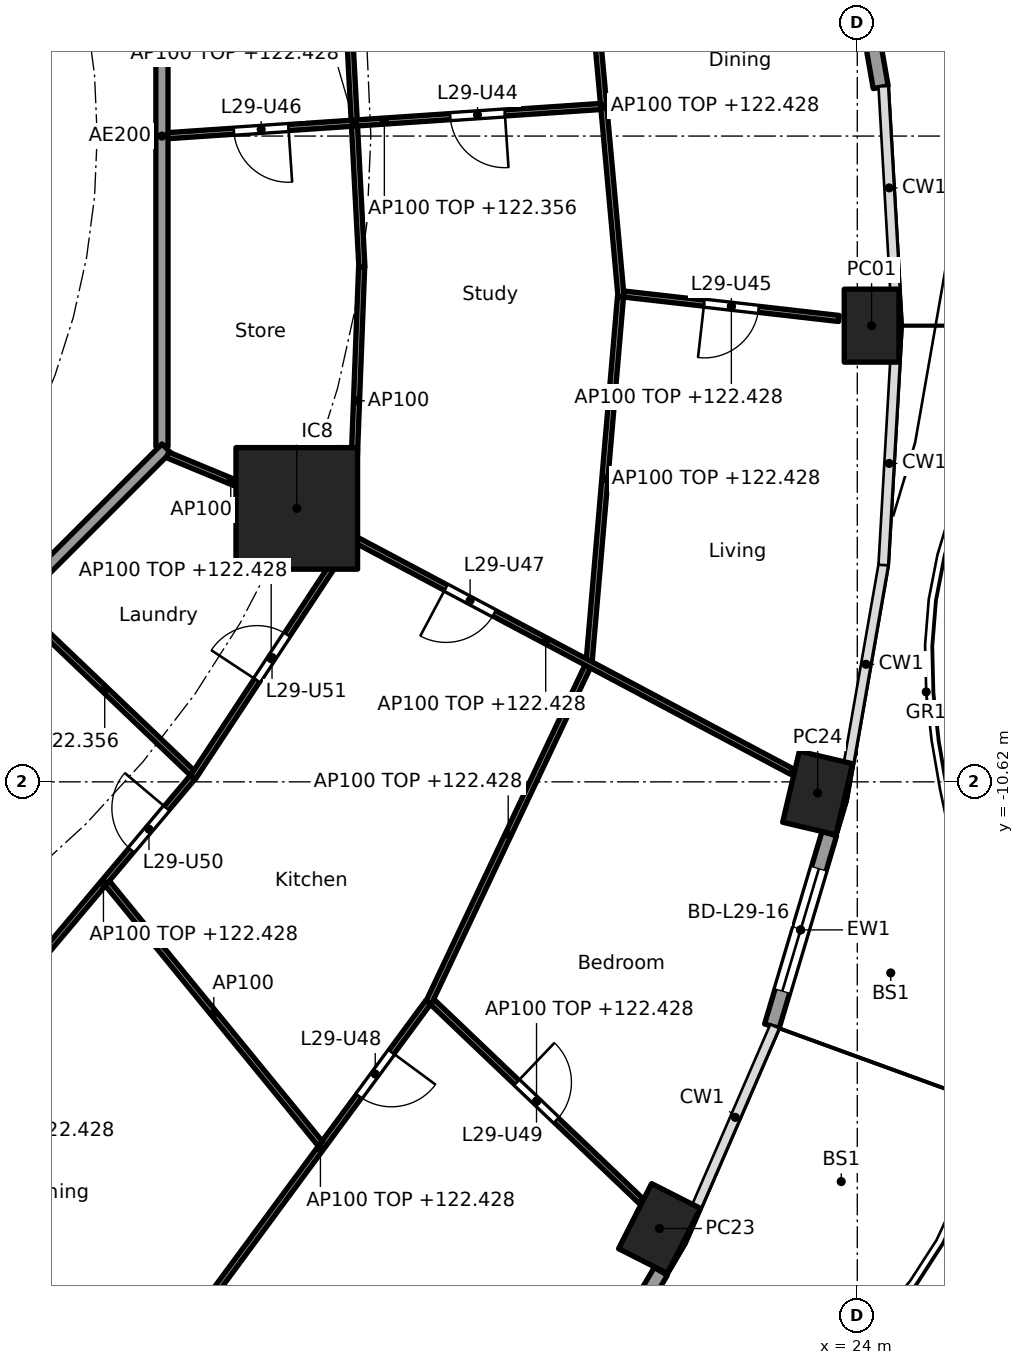
"""IFC4 building model, lengths in metres.
Left out: names, types, materials, properties, quantities, classifications, styles, units other than length and angle.
Written with IfcOpenShell. Run it as: python <this file> out.ifc"""

import sys

from ifc_helpers import new_model, si_unit, direction, frame, frame_2d, origin, origin_2d, place, context, subcontext, project, spatial, rectangle, hollow_rectangle, extrude, element, fill, save


model = new_model("IFC4")
c1 = context("Model", 3, precision=1e-05, world=origin(), true_north=direction((0.0, 1.0)))
c2 = subcontext(c1, "Body", "Model", "MODEL_VIEW")
j1 = project(units=[si_unit("LENGTHUNIT", "METRE"), si_unit("PLANEANGLEUNIT", "RADIAN")], contexts=[c1])
p1 = place(None, origin())
s1 = spatial("IfcSite", under=j1, at=p1, CompositionType="ELEMENT")
p2 = place(p1, origin())
s2 = spatial("IfcBuilding", under=s1, at=p2, CompositionType="ELEMENT")
p3 = place(p2, frame((0.0, 0.0, 119.6)))
s3 = spatial("IfcBuildingStorey", under=s2, at=p3, CompositionType="ELEMENT", Elevation=119.6)
for number, where, z_axis, x_axis in (
    (1, (24.235, -3.118, -0.26), (0.0, 0.0, 1.0), (0.0, 1.0, 0.0)),
    (2, (20.747, -17.965, -0.26), (0.0, 0.0, 1.0), (0.452, 0.892, 0.0)),
    (3, (23.348, -10.803, -0.26), (0.0, 0.0, 1.0), (0.229, 0.973, 0.0)),
):
    element("IfcColumn", number, at=place(p3, frame(where, z_axis=z_axis, x_axis=x_axis)), inside=s3, PredefinedType="COLUMN", context=c2, shape_type="SweptSolid", body=[
        extrude(hollow_rectangle(XDim=1.2, YDim=0.9, WallThickness=0.04, at=origin_2d()), origin(), (0.0, 0.0, 1.0), 3.96),
    ])
p4 = place(p3, frame((14.782, -6.123, 0.0), z_axis=(0.0, 0.0, 1.0), x_axis=(1.0, 0.0, 0.0)))
e4 = element("IfcColumn", 4, at=p4, inside=s3, PredefinedType="COLUMN", context=c2, shape_type="SweptSolid", body=[
    extrude(rectangle(XDim=2.0, YDim=2.0, at=origin_2d()), origin(), (0.0, 0.0, 1.0), 3.7),
])
p5 = place(p3, frame((23.811, 4.085, 0.0), z_axis=(0.0, 0.0, 1.0), x_axis=(0.172163521006, -0.985068384446, 0.0)))
e5 = element("IfcWall", 5, at=p5, inside=s3, PredefinedType="SOLIDWALL", context=c2, shape_type="SweptSolid", body=[
    extrude(rectangle(XDim=3.333, YDim=0.25, at=frame_2d((1.666, 0.0))), origin(), (0.0, 0.0, 1.0), 3.44),
])
p6 = place(p5, frame((0.616, 0.0, 0.0)))
e6 = element("IfcOpeningElement", 6, at=p6, cuts=e5, PredefinedType="OPENING", context=c2, shape_type="SweptSolid", body=[
    extrude(rectangle(XDim=2.1, YDim=2.4, at=frame_2d((1.05, 1.2))), frame((0.0, 0.135, 0.0), z_axis=(0.0, -1.0, 0.0), x_axis=(1.0, 0.0, 0.0)), (0.0, 0.0, 1.0), 0.27),
])
p7 = place(p3, frame((20.768, -18.669, 0.0), z_axis=(0.0, 0.0, 1.0), x_axis=(-0.506314982873, -0.862348617508, 0.0)))
e7 = element("IfcWall", 7, at=p7, inside=s3, PredefinedType="SOLIDWALL", context=c2, shape_type="SweptSolid", body=[
    extrude(rectangle(XDim=3.208, YDim=0.25, at=frame_2d((1.604, 0.0))), origin(), (0.0, 0.0, 1.0), 3.44),
])
p8 = place(p7, frame((0.554, 0.0, 0.0)))
e8 = element("IfcOpeningElement", 8, at=p8, cuts=e7, PredefinedType="OPENING", context=c2, shape_type="SweptSolid", body=[
    extrude(rectangle(XDim=2.1, YDim=2.4, at=frame_2d((1.05, 1.2))), frame((0.0, 0.135, 0.0), z_axis=(0.0, -1.0, 0.0), x_axis=(1.0, 0.0, 0.0)), (0.0, 0.0, 1.0), 0.27),
])
p9 = place(p3, frame((23.54, -11.472, 0.0), z_axis=(0.0, 0.0, 1.0), x_axis=(-0.285821792767, -0.958282788523, 0.0)))
e9 = element("IfcWall", 9, at=p9, inside=s3, PredefinedType="SOLIDWALL", context=c2, shape_type="SweptSolid", body=[
    extrude(rectangle(XDim=3.303, YDim=0.25, at=frame_2d((1.651, 0.0))), origin(), (0.0, 0.0, 1.0), 3.44),
])
p10 = place(p9, frame((0.602, 0.0, 0.0)))
e10 = element("IfcOpeningElement", 10, at=p10, cuts=e9, PredefinedType="OPENING", context=c2, shape_type="SweptSolid", body=[
    extrude(rectangle(XDim=2.1, YDim=2.4, at=frame_2d((1.05, 1.2))), frame((0.0, 0.135, 0.0), z_axis=(0.0, -1.0, 0.0), x_axis=(1.0, 0.0, 0.0)), (0.0, 0.0, 1.0), 0.27),
])
p11 = place(p3, frame((6.14, -14.829, 0.0), z_axis=(0.0, 0.0, 1.0), x_axis=(0.346169582481, -0.938171956608, 0.0)))
e11 = element("IfcWall", 11, at=p11, inside=s3, PredefinedType="PARTITIONING", context=c2, shape_type="SweptSolid", body=[
    extrude(rectangle(XDim=14.354, YDim=0.2, at=frame_2d((7.177, 0.0))), origin(), (0.0, 0.0, 1.0), 2.828),
])
p12 = place(p3, frame((12.565, -5.104, 0.0), z_axis=(0.0, 0.0, 1.0), x_axis=(0.0, 1.0, 0.0)))
e12 = element("IfcWall", 12, at=p12, inside=s3, PredefinedType="PARTITIONING", context=c2, shape_type="SweptSolid", body=[
    extrude(rectangle(XDim=10.209, YDim=0.2, at=frame_2d((5.104, 0.0))), origin(), (0.0, 0.0, 1.0), 3.44),
])
p13 = place(p3, frame((5.275, -12.494, 0.0), z_axis=(0.0, 0.0, 1.0), x_axis=(0.707106781187, 0.707106781187, 0.0)))
e13 = element("IfcWall", 13, at=p13, inside=s3, PredefinedType="PARTITIONING", context=c2, shape_type="SweptSolid", body=[
    extrude(rectangle(XDim=10.409, YDim=0.2, at=frame_2d((5.205, 0.0))), origin(), (0.0, 0.0, 1.0), 3.44),
])
p14 = place(p3, frame((15.853, -2.158, 0.0), z_axis=(0.0, 0.0, 1.0), x_axis=(-0.052483289253, 0.99862180246, 0.0)))
e14 = element("IfcWall", 14, at=p14, inside=s3, PredefinedType="PARTITIONING", context=c2, shape_type="SweptSolid", body=[
    extrude(rectangle(XDim=4.75, YDim=0.1, at=frame_2d((2.375, 0.0))), origin(), (0.0, 0.0, 1.0), 2.828),
])
p15 = place(p3, frame((15.849, -2.158, 0.0), z_axis=(0.0, 0.0, 1.0), x_axis=(-0.038390448414, -0.999262815014, 0.0)))
e15 = element("IfcWall", 15, at=p15, inside=s3, PredefinedType="PARTITIONING", context=c2, shape_type="SweptSolid", body=[
    extrude(rectangle(XDim=4.394, YDim=0.1, at=frame_2d((2.197, 0.0))), origin(), (0.0, 0.0, 1.0), 3.44),
])
p16 = place(p3, frame((20.16, -2.598, 0.0), z_axis=(0.0, 0.0, 1.0), x_axis=(0.993610673305, -0.112861994911, 0.0)))
e16 = element("IfcWall", 16, at=p16, inside=s3, PredefinedType="PARTITIONING", context=c2, shape_type="SweptSolid", body=[
    extrude(rectangle(XDim=3.561, YDim=0.1, at=frame_2d((1.78, 0.0))), origin(), (0.0, 0.0, 1.0), 2.828),
])
p17 = place(p16, frame((1.33, 0.0, 0.0)))
e17 = element("IfcOpeningElement", 17, at=p17, cuts=e16, PredefinedType="OPENING", context=c2, shape_type="SweptSolid", body=[
    extrude(rectangle(XDim=0.9, YDim=2.1, at=frame_2d((0.45, 1.05))), frame((0.0, 0.06, 0.0), z_axis=(0.0, -1.0, 0.0), x_axis=(1.0, 0.0, 0.0)), (0.0, 0.0, 1.0), 0.12),
])
p18 = place(p3, frame((20.115, -2.642, 0.0), z_axis=(0.0, 0.0, 1.0), x_axis=(-0.090563746294, 0.995890660593, 0.0)))
e18 = element("IfcWall", 18, at=p18, inside=s3, PredefinedType="PARTITIONING", context=c2, shape_type="SweptSolid", body=[
    extrude(rectangle(XDim=6.289, YDim=0.1, at=frame_2d((3.145, 0.0))), origin(), (0.0, 0.0, 1.0), 2.828),
])
p19 = place(p18, frame((4.242, 0.0, 0.0)))
e19 = element("IfcOpeningElement", 19, at=p19, cuts=e18, PredefinedType="OPENING", context=c2, shape_type="SweptSolid", body=[
    extrude(rectangle(XDim=0.9, YDim=2.1, at=frame_2d((0.45, 1.05))), frame((0.0, 0.06, 0.0), z_axis=(0.0, -1.0, 0.0), x_axis=(1.0, 0.0, 0.0)), (0.0, 0.0, 1.0), 0.12),
])
p20 = place(p3, frame((20.106, -2.642, 0.0), z_axis=(0.0, 0.0, 1.0), x_axis=(-0.085672025822, -0.996323393277, 0.0)))
e20 = element("IfcWall", 20, at=p20, inside=s3, PredefinedType="PARTITIONING", context=c2, shape_type="SweptSolid", body=[
    extrude(rectangle(XDim=6.007, YDim=0.1, at=frame_2d((3.003, 0.0))), origin(), (0.0, 0.0, 1.0), 2.828),
])
p21 = place(p3, frame((12.665, 0.007, 0.0), z_axis=(0.0, 0.0, 1.0), x_axis=(0.997737186236, 0.067234717233, 0.0)))
e21 = element("IfcWall", 21, at=p21, inside=s3, PredefinedType="PARTITIONING", context=c2, shape_type="SweptSolid", body=[
    extrude(rectangle(XDim=7.132, YDim=0.1, at=frame_2d((3.566, 0.0))), origin(), (0.0, 0.0, 1.0), 2.756),
])
p22 = place(p21, frame((4.651, 0.0, 0.0)))
e22 = element("IfcOpeningElement", 22, at=p22, cuts=e21, PredefinedType="OPENING", context=c2, shape_type="SweptSolid", body=[
    extrude(rectangle(XDim=0.9, YDim=2.1, at=frame_2d((0.45, 1.05))), frame((0.0, 0.06, 0.0), z_axis=(0.0, -1.0, 0.0), x_axis=(1.0, 0.0, 0.0)), (0.0, 0.0, 1.0), 0.12),
])
p23 = place(p21, frame((1.085, 0.0, 0.0)))
e23 = element("IfcOpeningElement", 23, at=p23, cuts=e21, PredefinedType="OPENING", context=c2, shape_type="SweptSolid", body=[
    extrude(rectangle(XDim=0.9, YDim=2.1, at=frame_2d((0.45, 1.05))), frame((0.0, 0.06, 0.0), z_axis=(0.0, -1.0, 0.0), x_axis=(1.0, 0.0, 0.0)), (0.0, 0.0, 1.0), 0.12),
])
p24 = place(p3, frame((10.138, -14.026, 0.0), z_axis=(0.0, 0.0, 1.0), x_axis=(0.644051444483, 0.764982180746, 0.0)))
e24 = element("IfcWall", 24, at=p24, inside=s3, PredefinedType="PARTITIONING", context=c2, shape_type="SweptSolid", body=[
    extrude(rectangle(XDim=4.548, YDim=0.1, at=frame_2d((2.274, 0.0))), origin(), (0.0, 0.0, 1.0), 2.828),
])
p25 = place(p24, frame((2.986, 0.0, 0.0)))
e25 = element("IfcOpeningElement", 25, at=p25, cuts=e24, PredefinedType="OPENING", context=c2, shape_type="SweptSolid", body=[
    extrude(rectangle(XDim=0.9, YDim=2.1, at=frame_2d((0.45, 1.05))), frame((0.0, 0.06, 0.0), z_axis=(0.0, -1.0, 0.0), x_axis=(1.0, 0.0, 0.0)), (0.0, 0.0, 1.0), 0.12),
])
p26 = place(p3, frame((13.397, -19.053, 0.0), z_axis=(0.0, 0.0, 1.0), x_axis=(0.593522299069, 0.804817544856, 0.0)))
e26 = element("IfcWall", 26, at=p26, inside=s3, PredefinedType="PARTITIONING", context=c2, shape_type="SweptSolid", body=[
    extrude(rectangle(XDim=5.976, YDim=0.1, at=frame_2d((2.988, 0.0))), origin(), (0.0, 0.0, 1.0), 2.828),
])
p27 = place(p26, frame((4.057, 0.0, 0.0)))
e27 = element("IfcOpeningElement", 27, at=p27, cuts=e26, PredefinedType="OPENING", context=c2, shape_type="SweptSolid", body=[
    extrude(rectangle(XDim=0.9, YDim=2.1, at=frame_2d((0.45, 1.05))), frame((0.0, 0.06, 0.0), z_axis=(0.0, -1.0, 0.0), x_axis=(1.0, 0.0, 0.0)), (0.0, 0.0, 1.0), 0.12),
])
p28 = place(p3, frame((11.667, -12.287, 0.0), z_axis=(0.0, 0.0, 1.0), x_axis=(0.633038312428, -0.774120465431, 0.0)))
e28 = element("IfcWall", 28, at=p28, inside=s3, PredefinedType="PARTITIONING", context=c2, shape_type="SweptSolid", body=[
    extrude(rectangle(XDim=5.532, YDim=0.1, at=frame_2d((2.766, 0.0))), origin(), (0.0, 0.0, 1.0), 3.44),
])
p29 = place(p3, frame((10.184, -7.727, 0.0), z_axis=(0.0, 0.0, 1.0), x_axis=(0.723654892782, -0.690162007179, 0.0)))
e29 = element("IfcWall", 29, at=p29, inside=s3, PredefinedType="PARTITIONING", context=c2, shape_type="SweptSolid", body=[
    extrude(rectangle(XDim=3.98, YDim=0.1, at=frame_2d((1.99, 0.0))), origin(), (0.0, 0.0, 1.0), 2.756),
])
p30 = place(p3, frame((13.072, -10.55, 0.0), z_axis=(0.0, 0.0, 1.0), x_axis=(0.550614843759, 0.834759422727, 0.0)))
e30 = element("IfcWall", 30, at=p30, inside=s3, PredefinedType="PARTITIONING", context=c2, shape_type="SweptSolid", body=[
    extrude(rectangle(XDim=4.683, YDim=0.1, at=frame_2d((2.341, 0.0))), origin(), (0.0, 0.0, 1.0), 2.828),
])
p31 = place(p30, frame((1.917, 0.0, 0.0)))
e31 = element("IfcOpeningElement", 31, at=p31, cuts=e30, PredefinedType="OPENING", context=c2, shape_type="SweptSolid", body=[
    extrude(rectangle(XDim=0.9, YDim=2.1, at=frame_2d((0.45, 1.05))), frame((0.0, 0.06, 0.0), z_axis=(0.0, -1.0, 0.0), x_axis=(1.0, 0.0, 0.0)), (0.0, 0.0, 1.0), 0.12),
])
p32 = place(p3, frame((17.01, -14.238, 0.0), z_axis=(0.0, 0.0, 1.0), x_axis=(0.723650186498, -0.690166941821, 0.0)))
e32 = element("IfcWall", 32, at=p32, inside=s3, PredefinedType="PARTITIONING", context=c2, shape_type="SweptSolid", body=[
    extrude(rectangle(XDim=4.74, YDim=0.1, at=frame_2d((2.37, 0.0))), origin(), (0.0, 0.0, 1.0), 2.828),
])
p33 = place(p32, frame((1.92, 0.0, 0.0)))
e33 = element("IfcOpeningElement", 33, at=p33, cuts=e32, PredefinedType="OPENING", context=c2, shape_type="SweptSolid", body=[
    extrude(rectangle(XDim=0.9, YDim=2.1, at=frame_2d((0.45, 1.05))), frame((0.0, 0.06, 0.0), z_axis=(0.0, -1.0, 0.0), x_axis=(1.0, 0.0, 0.0)), (0.0, 0.0, 1.0), 0.12),
])
p34 = place(p3, frame((16.953, -14.249, 0.0), z_axis=(0.0, 0.0, 1.0), x_axis=(0.427456178439, 0.904036069808, 0.0)))
e34 = element("IfcWall", 34, at=p34, inside=s3, PredefinedType="PARTITIONING", context=c2, shape_type="SweptSolid", body=[
    extrude(rectangle(XDim=6.113, YDim=0.1, at=frame_2d((3.057, 0.0))), origin(), (0.0, 0.0, 1.0), 2.828),
])
p35 = place(p3, frame((12.657, -5.243, 0.0), z_axis=(0.0, 0.0, 1.0), x_axis=(0.923864733477, -0.382719158442, 0.0)))
e35 = element("IfcWall", 35, at=p35, inside=s3, PredefinedType="PARTITIONING", context=c2, shape_type="SweptSolid", body=[
    extrude(rectangle(XDim=2.25, YDim=0.1, at=frame_2d((1.125, 0.0))), origin(), (0.0, 0.0, 1.0), 3.44),
])
p36 = place(p3, frame((14.826, -6.146, 0.0), z_axis=(0.0, 0.0, 1.0), x_axis=(0.883012998471, -0.469348532044, 0.0)))
e36 = element("IfcWall", 36, at=p36, inside=s3, PredefinedType="PARTITIONING", context=c2, shape_type="SweptSolid", body=[
    extrude(rectangle(XDim=9.172, YDim=0.1, at=frame_2d((4.586, 0.0))), origin(), (0.0, 0.0, 1.0), 2.828),
])
p37 = place(p36, frame((2.728, 0.0, 0.0)))
e37 = element("IfcOpeningElement", 37, at=p37, cuts=e36, PredefinedType="OPENING", context=c2, shape_type="SweptSolid", body=[
    extrude(rectangle(XDim=0.9, YDim=2.1, at=frame_2d((0.45, 1.05))), frame((0.0, 0.06, 0.0), z_axis=(0.0, -1.0, 0.0), x_axis=(1.0, 0.0, 0.0)), (0.0, 0.0, 1.0), 0.12),
])
p38 = place(p10, origin())
e38 = element("IfcDoor", 38, at=p38, inside=s3, OperationType="SLIDING_TO_LEFT", PredefinedType="DOOR", context=c2, shape_type="SweptSolid", body=[
    extrude(rectangle(XDim=2.1, YDim=2.4, at=frame_2d((1.05, 1.2))), frame((0.0, 0.025, 0.0), z_axis=(0.0, -1.0, 0.0), x_axis=(1.0, 0.0, 0.0)), (0.0, 0.0, 1.0), 0.05),
])
fill(e10, e38)
p39 = place(p22, frame((0.9, 0.0, 0.0), x_axis=(-1.0, 0.0, 0.0)))
e39 = element("IfcDoor", 39, at=p39, inside=s3, OperationType="SINGLE_SWING_LEFT", PredefinedType="DOOR", context=c2, shape_type="SweptSolid", body=[
    extrude(rectangle(XDim=0.9, YDim=2.1, at=frame_2d((0.45, 1.05))), frame((0.0, 0.025, 0.0), z_axis=(0.0, -1.0, 0.0), x_axis=(1.0, 0.0, 0.0)), (0.0, 0.0, 1.0), 0.05),
])
fill(e22, e39)
p40 = place(p17, frame((0.9, 0.0, 0.0), x_axis=(-1.0, 0.0, 0.0)))
e40 = element("IfcDoor", 40, at=p40, inside=s3, OperationType="SINGLE_SWING_RIGHT", PredefinedType="DOOR", context=c2, shape_type="SweptSolid", body=[
    extrude(rectangle(XDim=0.9, YDim=2.1, at=frame_2d((0.45, 1.05))), frame((0.0, 0.025, 0.0), z_axis=(0.0, -1.0, 0.0), x_axis=(1.0, 0.0, 0.0)), (0.0, 0.0, 1.0), 0.05),
])
fill(e17, e40)
p41 = place(p23, frame((0.9, 0.0, 0.0), x_axis=(-1.0, 0.0, 0.0)))
e41 = element("IfcDoor", 41, at=p41, inside=s3, OperationType="SINGLE_SWING_LEFT", PredefinedType="DOOR", context=c2, shape_type="SweptSolid", body=[
    extrude(rectangle(XDim=0.9, YDim=2.1, at=frame_2d((0.45, 1.05))), frame((0.0, 0.025, 0.0), z_axis=(0.0, -1.0, 0.0), x_axis=(1.0, 0.0, 0.0)), (0.0, 0.0, 1.0), 0.05),
])
fill(e23, e41)
p42 = place(p37, frame((0.9, 0.0, 0.0), x_axis=(-1.0, 0.0, 0.0)))
e42 = element("IfcDoor", 42, at=p42, inside=s3, OperationType="SINGLE_SWING_RIGHT", PredefinedType="DOOR", context=c2, shape_type="SweptSolid", body=[
    extrude(rectangle(XDim=0.9, YDim=2.1, at=frame_2d((0.45, 1.05))), frame((0.0, 0.025, 0.0), z_axis=(0.0, -1.0, 0.0), x_axis=(1.0, 0.0, 0.0)), (0.0, 0.0, 1.0), 0.05),
])
fill(e37, e42)
p43 = place(p27, frame((0.9, 0.0, 0.0), x_axis=(-1.0, 0.0, 0.0)))
e43 = element("IfcDoor", 43, at=p43, inside=s3, OperationType="SINGLE_SWING_LEFT", PredefinedType="DOOR", context=c2, shape_type="SweptSolid", body=[
    extrude(rectangle(XDim=0.9, YDim=2.1, at=frame_2d((0.45, 1.05))), frame((0.0, 0.025, 0.0), z_axis=(0.0, -1.0, 0.0), x_axis=(1.0, 0.0, 0.0)), (0.0, 0.0, 1.0), 0.05),
])
fill(e27, e43)
p44 = place(p33, origin())
e44 = element("IfcDoor", 44, at=p44, inside=s3, OperationType="SINGLE_SWING_LEFT", PredefinedType="DOOR", context=c2, shape_type="SweptSolid", body=[
    extrude(rectangle(XDim=0.9, YDim=2.1, at=frame_2d((0.45, 1.05))), frame((0.0, 0.025, 0.0), z_axis=(0.0, -1.0, 0.0), x_axis=(1.0, 0.0, 0.0)), (0.0, 0.0, 1.0), 0.05),
])
fill(e33, e44)
p45 = place(p25, origin())
e45 = element("IfcDoor", 45, at=p45, inside=s3, OperationType="SINGLE_SWING_RIGHT", PredefinedType="DOOR", context=c2, shape_type="SweptSolid", body=[
    extrude(rectangle(XDim=0.9, YDim=2.1, at=frame_2d((0.45, 1.05))), frame((0.0, 0.025, 0.0), z_axis=(0.0, -1.0, 0.0), x_axis=(1.0, 0.0, 0.0)), (0.0, 0.0, 1.0), 0.05),
])
fill(e25, e45)
p46 = place(p31, origin())
e46 = element("IfcDoor", 46, at=p46, inside=s3, OperationType="SINGLE_SWING_LEFT", PredefinedType="DOOR", context=c2, shape_type="SweptSolid", body=[
    extrude(rectangle(XDim=0.9, YDim=2.1, at=frame_2d((0.45, 1.05))), frame((0.0, 0.025, 0.0), z_axis=(0.0, -1.0, 0.0), x_axis=(1.0, 0.0, 0.0)), (0.0, 0.0, 1.0), 0.05),
])
fill(e31, e46)
save(model, sys.argv[1])
